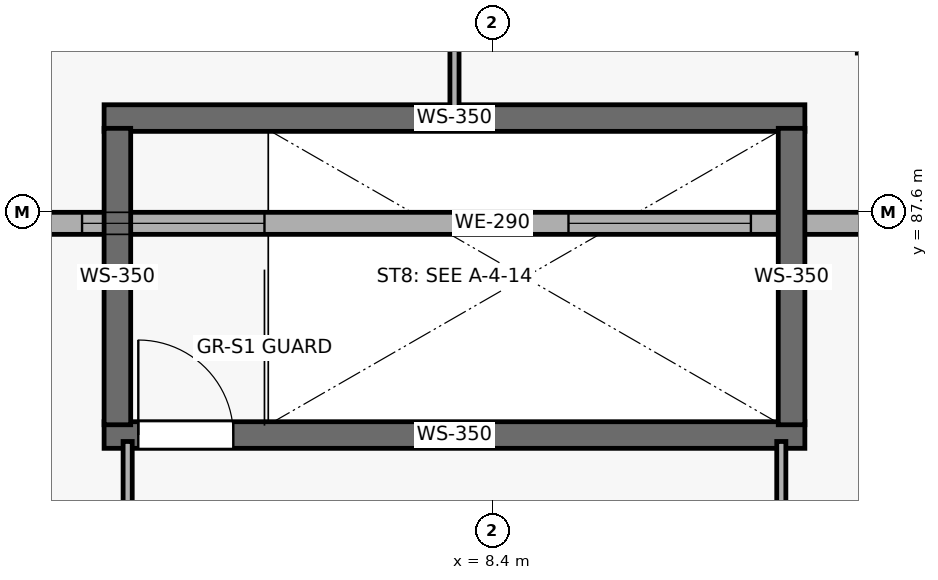
"""IFC4 building model, lengths in metres.
Left out: names, types, materials, properties, quantities, classifications, styles, units other than length and angle.
Written with IfcOpenShell. Run it as: python <this file> out.ifc"""

import sys

from ifc_helpers import new_model, si_unit, direction, frame, frame_2d, origin, place, context, subcontext, project, spatial, rectangle, extrude, element, fill, save


model = new_model("IFC4")
c1 = context("Model", 3, precision=1e-05, world=origin(), true_north=direction((0.0, 1.0)))
c2 = subcontext(c1, "Body", "Model", "MODEL_VIEW")
j1 = project(units=[si_unit("LENGTHUNIT", "METRE"), si_unit("PLANEANGLEUNIT", "RADIAN")], contexts=[c1])
p1 = place(None, origin())
s1 = spatial("IfcSite", under=j1, at=p1, CompositionType="ELEMENT")
p2 = place(p1, origin())
s2 = spatial("IfcBuilding", under=s1, at=p2, CompositionType="ELEMENT")
p3 = place(p2, frame((0.0, 0.0, 25.5)))
s3 = spatial("IfcBuildingStorey", under=s2, at=p3, CompositionType="ELEMENT", Elevation=25.5)
p4 = place(p3, frame((0.8, 87.45, 5.1), z_axis=(0.0, 0.0, 1.0), x_axis=(1.0, 0.0, 0.0)))
e1 = element("IfcWall", 1, at=p4, inside=s3, PredefinedType="SOLIDWALL", context=c2, shape_type="SweptSolid", body=[
    extrude(rectangle(XDim=15.2, YDim=0.29, at=frame_2d((7.6, 0.0))), origin(), (0.0, 0.0, 1.0), 2.55),
])
p5 = place(p4, frame((2.2, 0.0, 0.45)))
e2 = element("IfcOpeningElement", 2, at=p5, cuts=e1, PredefinedType="OPENING", context=c2, shape_type="SweptSolid", body=[
    extrude(rectangle(XDim=2.4, YDim=1.35, at=frame_2d((1.2, 0.675))), frame((0.0, 0.155, 0.0), z_axis=(0.0, -1.0, 0.0), x_axis=(1.0, 0.0, 0.0)), (0.0, 0.0, 1.0), 0.31),
])
p6 = place(p4, frame((8.6, 0.0, 0.45)))
e3 = element("IfcOpeningElement", 3, at=p6, cuts=e1, PredefinedType="OPENING", context=c2, shape_type="SweptSolid", body=[
    extrude(rectangle(XDim=2.4, YDim=1.35, at=frame_2d((1.2, 0.675))), frame((0.0, 0.155, 0.0), z_axis=(0.0, -1.0, 0.0), x_axis=(1.0, 0.0, 0.0)), (0.0, 0.0, 1.0), 0.31),
])
p7 = place(p3, frame((3.29, 84.665, 0.0), z_axis=(0.0, 0.0, 1.0), x_axis=(1.0, 0.0, 0.0)))
e4 = element("IfcWall", 4, at=p7, inside=s3, PredefinedType="SHEAR", context=c2, shape_type="SweptSolid", body=[
    extrude(rectangle(XDim=9.22, YDim=0.35, at=frame_2d((4.61, 0.0))), origin(), (0.0, 0.0, 1.0), 4.82),
])
p8 = place(p7, frame((0.45, 0.0, 0.0)))
e5 = element("IfcOpeningElement", 5, at=p8, cuts=e4, PredefinedType="OPENING", context=c2, shape_type="SweptSolid", body=[
    extrude(rectangle(XDim=1.25, YDim=2.2, at=frame_2d((0.625, 1.1))), frame((0.0, 0.185, 0.0), z_axis=(0.0, -1.0, 0.0), x_axis=(1.0, 0.0, 0.0)), (0.0, 0.0, 1.0), 0.37),
])
p9 = place(p3, frame((12.51, 88.835, 0.0), z_axis=(0.0, 0.0, 1.0), x_axis=(-1.0, 0.0, 0.0)))
e6 = element("IfcWall", 6, at=p9, inside=s3, PredefinedType="SHEAR", context=c2, shape_type="SweptSolid", body=[
    extrude(rectangle(XDim=9.22, YDim=0.35, at=frame_2d((4.61, 0.0))), origin(), (0.0, 0.0, 1.0), 4.82),
])
for number, where, z_axis, x_axis in (
    (7, (3.465, 84.8, 0.0), (0.0, 0.0, 1.0), (0.0, 1.0, 0.0)),
    (8, (12.335, 88.7, 0.0), (0.0, 0.0, 1.0), (0.0, -1.0, 0.0)),
):
    element("IfcWall", number, at=place(p3, frame(where, z_axis=z_axis, x_axis=x_axis)), inside=s3, PredefinedType="SHEAR", context=c2, shape_type="SweptSolid", body=[
        extrude(rectangle(XDim=3.9, YDim=0.35, at=frame_2d((1.95, 0.0))), origin(), (0.0, 0.0, 1.0), 4.82),
    ])
p10 = place(p3, frame((7.9, 94.74, 0.0), z_axis=(0.0, 0.0, 1.0), x_axis=(0.0, -1.0, 0.0)))
e9 = element("IfcWall", 9, at=p10, inside=s3, PredefinedType="PARTITIONING", context=c2, shape_type="SweptSolid", body=[
    extrude(rectangle(XDim=5.82, YDim=0.12, at=frame_2d((2.91, 0.0))), origin(), (0.0, 0.0, 1.0), 4.82),
])
p11 = place(p3, frame((3.6, 84.58, 0.0), z_axis=(0.0, 0.0, 1.0), x_axis=(0.0, -1.0, 0.0)))
e10 = element("IfcWall", 10, at=p11, inside=s3, PredefinedType="PARTITIONING", context=c2, shape_type="SweptSolid", body=[
    extrude(rectangle(XDim=2.64, YDim=0.12, at=frame_2d((1.32, 0.0))), origin(), (0.0, 0.0, 1.0), 4.82),
])
p12 = place(p3, frame((12.2, 81.8, 0.0), z_axis=(0.0, 0.0, 1.0), x_axis=(0.0, 1.0, 0.0)))
e11 = element("IfcWall", 11, at=p12, inside=s3, PredefinedType="PARTITIONING", context=c2, shape_type="SweptSolid", body=[
    extrude(rectangle(XDim=2.78, YDim=0.12, at=frame_2d((1.39, 0.0))), origin(), (0.0, 0.0, 1.0), 4.82),
])
p13 = place(p5, origin())
e12 = element("IfcWindow", 12, at=p13, inside=s3, PartitioningType="SINGLE_PANEL", PredefinedType="WINDOW", context=c2, shape_type="SweptSolid", body=[
    extrude(rectangle(XDim=2.4, YDim=1.35, at=frame_2d((1.2, 0.675))), frame((0.0, 0.03, 0.0), z_axis=(0.0, -1.0, 0.0), x_axis=(1.0, 0.0, 0.0)), (0.0, 0.0, 1.0), 0.06),
])
fill(e2, e12)
p14 = place(p6, origin())
e13 = element("IfcWindow", 13, at=p14, inside=s3, PartitioningType="SINGLE_PANEL", PredefinedType="WINDOW", context=c2, shape_type="SweptSolid", body=[
    extrude(rectangle(XDim=2.4, YDim=1.35, at=frame_2d((1.2, 0.675))), frame((0.0, 0.03, 0.0), z_axis=(0.0, -1.0, 0.0), x_axis=(1.0, 0.0, 0.0)), (0.0, 0.0, 1.0), 0.06),
])
fill(e3, e13)
p15 = place(p8, origin())
e14 = element("IfcDoor", 14, at=p15, inside=s3, OperationType="SINGLE_SWING_LEFT", PredefinedType="DOOR", context=c2, shape_type="SweptSolid", body=[
    extrude(rectangle(XDim=1.25, YDim=2.2, at=frame_2d((0.625, 1.1))), frame((0.0, 0.025, 0.0), z_axis=(0.0, -1.0, 0.0), x_axis=(1.0, 0.0, 0.0)), (0.0, 0.0, 1.0), 0.05),
])
fill(e5, e14)
save(model, sys.argv[1])
